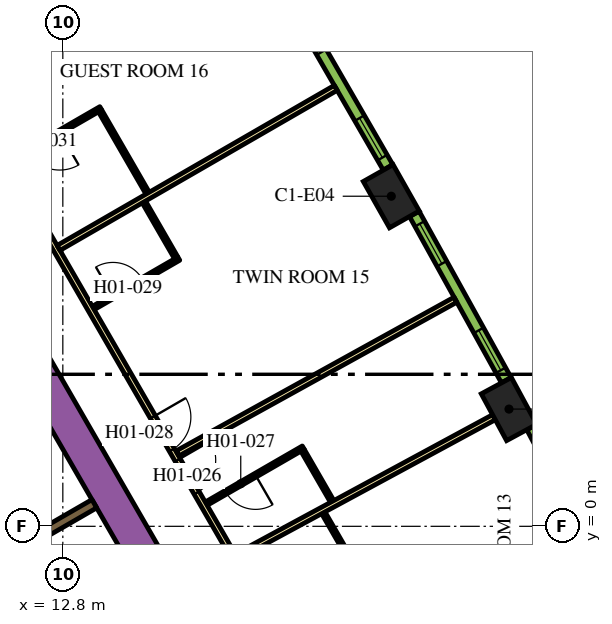
"""IFC4 building model, lengths in metres.
Left out: names, types, materials, properties, quantities, classifications, styles, units other than length and angle.
Written with IfcOpenShell. Run it as: python <this file> out.ifc"""

import sys

from ifc_helpers import new_model, si_unit, direction, frame, frame_2d, origin, origin_2d, place, context, subcontext, project, spatial, rectangle, extrude, element, fill, save


model = new_model("IFC4")
c1 = context("Model", 3, precision=1e-05, world=origin(), true_north=direction((0.0, 1.0)))
c2 = subcontext(c1, "Body", "Model", "MODEL_VIEW")
j1 = project(units=[si_unit("LENGTHUNIT", "METRE"), si_unit("PLANEANGLEUNIT", "RADIAN")], contexts=[c1])
p1 = place(None, origin())
s1 = spatial("IfcSite", under=j1, at=p1, CompositionType="ELEMENT")
p2 = place(p1, origin())
s2 = spatial("IfcBuilding", under=s1, at=p2, CompositionType="ELEMENT")
p3 = place(p2, frame((0.0, 0.0, 31.5)))
s3 = spatial("IfcBuildingStorey", under=s2, at=p3, CompositionType="ELEMENT", Elevation=31.5)
for number, where, z_axis, x_axis in (
    (1, (24.54, 3.085, 0.0), (0.0, 0.0, 1.0), (-0.476, 0.88, 0.0)),
    (2, (21.443, 8.685, 0.0), (0.0, 0.0, 1.0), (-0.492, 0.871, 0.0)),
):
    element("IfcColumn", number, at=place(p3, frame(where, z_axis=z_axis, x_axis=x_axis)), inside=s3, PredefinedType="COLUMN", context=c2, shape_type="SweptSolid", body=[
        extrude(rectangle(XDim=1.4, YDim=0.9, at=origin_2d()), origin(), (0.0, 0.0, 1.0), 3.9),
    ])
p4 = place(p3, frame((6.711, 13.476, 0.0), z_axis=(0.0, 0.0, 1.0), x_axis=(0.500002723396, -0.866023831425, 0.0)))
e3 = element("IfcWall", 3, at=p4, inside=s3, PredefinedType="SOLIDWALL", context=c2, shape_type="SweptSolid", body=[
    extrude(rectangle(XDim=20.334, YDim=0.9, at=frame_2d((10.167, 0.0))), origin(), (0.0, 0.0, 1.0), 3.9),
])
p5 = place(p3, frame((13.629, 0.594, 0.0), z_axis=(0.0, 0.0, 1.0), x_axis=(-0.86602790099, -0.499995674689, 0.0)))
e4 = element("IfcWall", 4, at=p5, inside=s3, PredefinedType="SOLIDWALL", context=c2, shape_type="SweptSolid", body=[
    extrude(rectangle(XDim=3.146, YDim=0.25, at=frame_2d((1.573, 0.0))), origin(), (0.0, 0.0, 1.0), 3.9),
])
p6 = place(p3, frame((6.163, 18.475, 0.0), z_axis=(0.0, 0.0, 1.0), x_axis=(0.500001317485, -0.866024643133, 0.0)))
e5 = element("IfcWall", 5, at=p6, inside=s3, PredefinedType="PARTITIONING", context=c2, shape_type="SweptSolid", body=[
    extrude(rectangle(XDim=25.767, YDim=0.15, at=frame_2d((12.883, 0.0))), origin(), (0.0, 0.0, 1.0), 2.75),
])
p7 = place(p6, frame((24.586, 0.0, 0.0)))
e6 = element("IfcOpeningElement", 6, at=p7, cuts=e5, PredefinedType="OPENING", context=c2, shape_type="SweptSolid", body=[
    extrude(rectangle(XDim=1.0, YDim=2.1, at=frame_2d((0.5, 1.05))), frame((0.0, 0.085, 0.0), z_axis=(0.0, -1.0, 0.0), x_axis=(1.0, 0.0, 0.0)), (0.0, 0.0, 1.0), 0.17),
])
p8 = place(p6, frame((19.319, 0.0, 0.0)))
e7 = element("IfcOpeningElement", 7, at=p8, cuts=e5, PredefinedType="OPENING", context=c2, shape_type="SweptSolid", body=[
    extrude(rectangle(XDim=1.0, YDim=2.1, at=frame_2d((0.5, 1.05))), frame((0.0, 0.085, 0.0), z_axis=(0.0, -1.0, 0.0), x_axis=(1.0, 0.0, 0.0)), (0.0, 0.0, 1.0), 0.17),
])
p9 = place(p6, frame((18.012, 0.0, 0.0)))
e8 = element("IfcOpeningElement", 8, at=p9, cuts=e5, PredefinedType="OPENING", context=c2, shape_type="SweptSolid", body=[
    extrude(rectangle(XDim=1.0, YDim=2.1, at=frame_2d((0.5, 1.05))), frame((0.0, 0.085, 0.0), z_axis=(0.0, -1.0, 0.0), x_axis=(1.0, 0.0, 0.0)), (0.0, 0.0, 1.0), 0.17),
])
p10 = place(p6, frame((6.824, 0.0, 0.0)))
e9 = element("IfcOpeningElement", 9, at=p10, cuts=e5, PredefinedType="OPENING", context=c2, shape_type="SweptSolid", body=[
    extrude(rectangle(XDim=1.1, YDim=2.1, at=frame_2d((0.55, 1.05))), frame((0.0, 0.085, 0.0), z_axis=(0.0, -1.0, 0.0), x_axis=(1.0, 0.0, 0.0)), (0.0, 0.0, 1.0), 0.17),
])
p11 = place(p6, frame((4.658, 0.0, 0.0)))
e10 = element("IfcOpeningElement", 10, at=p11, cuts=e5, PredefinedType="OPENING", context=c2, shape_type="SweptSolid", body=[
    extrude(rectangle(XDim=0.9, YDim=2.1, at=frame_2d((0.45, 1.05))), frame((0.0, 0.085, 0.0), z_axis=(0.0, -1.0, 0.0), x_axis=(1.0, 0.0, 0.0)), (0.0, 0.0, 1.0), 0.17),
])
p12 = place(p6, frame((0.18, 0.0, 0.0)))
e11 = element("IfcOpeningElement", 11, at=p12, cuts=e5, PredefinedType="OPENING", context=c2, shape_type="SweptSolid", body=[
    extrude(rectangle(XDim=1.0, YDim=2.1, at=frame_2d((0.5, 1.05))), frame((0.0, 0.085, 0.0), z_axis=(0.0, -1.0, 0.0), x_axis=(1.0, 0.0, 0.0)), (0.0, 0.0, 1.0), 0.17),
])
p13 = place(p3, frame((19.982, 11.537, 0.0), z_axis=(0.0, 0.0, 1.0), x_axis=(-0.866020994654, -0.500007636761, 0.0)))
e12 = element("IfcWall", 12, at=p13, inside=s3, PredefinedType="PARTITIONING", context=c2, shape_type="SweptSolid", body=[
    extrude(rectangle(XDim=8.423, YDim=0.15, at=frame_2d((4.211, 0.0))), origin(), (0.0, 0.0, 1.0), 2.75),
])
p14 = place(p3, frame((23.132, 5.962, 0.0), z_axis=(0.0, 0.0, 1.0), x_axis=(-0.875121716713, -0.483902863121, 0.0)))
e13 = element("IfcWall", 13, at=p14, inside=s3, PredefinedType="PARTITIONING", context=c2, shape_type="SweptSolid", body=[
    extrude(rectangle(XDim=8.355, YDim=0.15, at=frame_2d((4.178, 0.0))), origin(), (0.0, 0.0, 1.0), 2.75),
])
p15 = place(p3, frame((24.145, 2.871, 0.0), z_axis=(0.0, 0.0, 1.0), x_axis=(-0.879551725039, -0.475803281809, 0.0)))
e14 = element("IfcWall", 14, at=p15, inside=s3, PredefinedType="PARTITIONING", context=c2, shape_type="SweptSolid", body=[
    extrude(rectangle(XDim=7.688, YDim=0.15, at=frame_2d((3.844, 0.0))), origin(), (0.0, 0.0, 1.0), 2.75),
])
p16 = place(p3, frame((20.434, -0.993, 0.0), z_axis=(0.0, 0.0, 1.0), x_axis=(-0.500086022567, 0.865975732936, 0.0)))
e15 = element("IfcWall", 15, at=p16, inside=s3, PredefinedType="PARTITIONING", context=c2, shape_type="SweptSolid", body=[
    extrude(rectangle(XDim=1.55, YDim=0.1, at=frame_2d((0.775, 0.0))), origin(), (0.0, 0.0, 1.0), 2.75),
])
p17 = place(p3, frame((19.127, 2.071, 0.0), z_axis=(0.0, 0.0, 1.0), x_axis=(-0.866003658127, -0.500037662692, 0.0)))
e16 = element("IfcWall", 16, at=p17, inside=s3, PredefinedType="PARTITIONING", context=c2, shape_type="SweptSolid", body=[
    extrude(rectangle(XDim=2.95, YDim=0.1, at=frame_2d((1.475, 0.0))), origin(), (0.0, 0.0, 1.0), 2.75),
])
p18 = place(p17, frame((1.45, 0.0, 0.0)))
e17 = element("IfcOpeningElement", 17, at=p18, cuts=e16, PredefinedType="OPENING", context=c2, shape_type="SweptSolid", body=[
    extrude(rectangle(XDim=0.9, YDim=2.1, at=frame_2d((0.45, 1.05))), frame((0.0, 0.06, 0.0), z_axis=(0.0, -1.0, 0.0), x_axis=(1.0, 0.0, 0.0)), (0.0, 0.0, 1.0), 0.12),
])
p19 = place(p3, frame((19.109, 2.002, 0.0), z_axis=(0.0, 0.0, 1.0), x_axis=(0.500086022567, -0.865975732936, 0.0)))
e18 = element("IfcWall", 18, at=p19, inside=s3, PredefinedType="PARTITIONING", context=c2, shape_type="SweptSolid", body=[
    extrude(rectangle(XDim=1.55, YDim=0.1, at=frame_2d((0.775, 0.0))), origin(), (0.0, 0.0, 1.0), 2.75),
])
p20 = place(p3, frame((13.6, 5.744, 0.0), z_axis=(0.0, 0.0, 1.0), x_axis=(0.866021400173, 0.500006934395, 0.0)))
e19 = element("IfcWall", 19, at=p20, inside=s3, PredefinedType="PARTITIONING", context=c2, shape_type="SweptSolid", body=[
    extrude(rectangle(XDim=2.6, YDim=0.1, at=frame_2d((1.3, 0.0))), origin(), (0.0, 0.0, 1.0), 2.75),
])
p21 = place(p20, frame((0.6, 0.0, 0.0)))
e20 = element("IfcOpeningElement", 20, at=p21, cuts=e19, PredefinedType="OPENING", context=c2, shape_type="SweptSolid", body=[
    extrude(rectangle(XDim=0.9, YDim=2.1, at=frame_2d((0.45, 1.05))), frame((0.0, 0.06, 0.0), z_axis=(0.0, -1.0, 0.0), x_axis=(1.0, 0.0, 0.0)), (0.0, 0.0, 1.0), 0.12),
])
p22 = place(p3, frame((15.779, 7.071, 0.0), z_axis=(0.0, 0.0, 1.0), x_axis=(-0.499976720371, 0.866038843867, 0.0)))
e21 = element("IfcWall", 21, at=p22, inside=s3, PredefinedType="PARTITIONING", context=c2, shape_type="SweptSolid", body=[
    extrude(rectangle(XDim=1.69, YDim=0.1, at=frame_2d((0.845, 0.0))), origin(), (0.0, 0.0, 1.0), 2.75),
])
p23 = place(p3, frame((13.799, 10.999, 0.0), z_axis=(0.0, 0.0, 1.0), x_axis=(-0.866034573852, -0.49998411664, 0.0)))
e22 = element("IfcWall", 22, at=p23, inside=s3, PredefinedType="PARTITIONING", context=c2, shape_type="SweptSolid", body=[
    extrude(rectangle(XDim=2.8, YDim=0.1, at=frame_2d((1.4, 0.0))), origin(), (0.0, 0.0, 1.0), 2.75),
])
p24 = place(p23, frame((1.25, 0.0, 0.0)))
e23 = element("IfcOpeningElement", 23, at=p24, cuts=e22, PredefinedType="OPENING", context=c2, shape_type="SweptSolid", body=[
    extrude(rectangle(XDim=1.0, YDim=2.1, at=frame_2d((0.5, 1.05))), frame((0.0, 0.06, 0.0), z_axis=(0.0, -1.0, 0.0), x_axis=(1.0, 0.0, 0.0)), (0.0, 0.0, 1.0), 0.12),
])
p25 = place(p3, frame((13.781, 10.931, 0.0), z_axis=(0.0, 0.0, 1.0), x_axis=(0.500004234368, -0.866022959057, 0.0)))
e24 = element("IfcWall", 24, at=p25, inside=s3, PredefinedType="PARTITIONING", context=c2, shape_type="SweptSolid", body=[
    extrude(rectangle(XDim=2.5, YDim=0.1, at=frame_2d((1.25, 0.0))), origin(), (0.0, 0.0, 1.0), 2.75),
])
p26 = place(p3, frame((27.475, -1.81, 0.0), z_axis=(0.0, 0.0, 1.0), x_axis=(-0.467629620899, 0.883924509026, 0.0)))
e25 = element("IfcWall", 25, at=p26, inside=s3, PredefinedType="SOLIDWALL", context=c2, shape_type="SweptSolid", body=[
    extrude(rectangle(XDim=4.998, YDim=0.29, at=frame_2d((2.499, 0.0))), origin(), (0.0, 0.0, 1.0), 3.65),
])
p27 = place(p26, frame((0.297, 0.0, 0.9)))
e26 = element("IfcOpeningElement", 26, at=p27, cuts=e25, PredefinedType="OPENING", context=c2, shape_type="SweptSolid", body=[
    extrude(rectangle(XDim=1.2, YDim=2.15, at=frame_2d((0.6, 1.075))), frame((0.0, 0.155, 0.0), z_axis=(0.0, -1.0, 0.0), x_axis=(1.0, 0.0, 0.0)), (0.0, 0.0, 1.0), 0.31),
])
p28 = place(p26, frame((3.501, 0.0, 0.9)))
e27 = element("IfcOpeningElement", 27, at=p28, cuts=e25, PredefinedType="OPENING", context=c2, shape_type="SweptSolid", body=[
    extrude(rectangle(XDim=1.2, YDim=2.15, at=frame_2d((0.6, 1.075))), frame((0.0, 0.155, 0.0), z_axis=(0.0, -1.0, 0.0), x_axis=(1.0, 0.0, 0.0)), (0.0, 0.0, 1.0), 0.31),
])
p29 = place(p3, frame((24.468, 3.846, 0.0), z_axis=(0.0, 0.0, 1.0), x_axis=(-0.483912572871, 0.875116347589, 0.0)))
e28 = element("IfcWall", 28, at=p29, inside=s3, PredefinedType="SOLIDWALL", context=c2, shape_type="SweptSolid", body=[
    extrude(rectangle(XDim=4.998, YDim=0.29, at=frame_2d((2.499, 0.0))), origin(), (0.0, 0.0, 1.0), 3.65),
])
p30 = place(p29, frame((0.297, 0.0, 0.9)))
e29 = element("IfcOpeningElement", 29, at=p30, cuts=e28, PredefinedType="OPENING", context=c2, shape_type="SweptSolid", body=[
    extrude(rectangle(XDim=1.2, YDim=2.15, at=frame_2d((0.6, 1.075))), frame((0.0, 0.155, 0.0), z_axis=(0.0, -1.0, 0.0), x_axis=(1.0, 0.0, 0.0)), (0.0, 0.0, 1.0), 0.31),
])
p31 = place(p29, frame((3.501, 0.0, 0.9)))
e30 = element("IfcOpeningElement", 30, at=p31, cuts=e28, PredefinedType="OPENING", context=c2, shape_type="SweptSolid", body=[
    extrude(rectangle(XDim=1.2, YDim=2.15, at=frame_2d((0.6, 1.075))), frame((0.0, 0.155, 0.0), z_axis=(0.0, -1.0, 0.0), x_axis=(1.0, 0.0, 0.0)), (0.0, 0.0, 1.0), 0.31),
])
p32 = place(p3, frame((21.357, 9.445, 0.0), z_axis=(0.0, 0.0, 1.0), x_axis=(-0.50002123722, 0.866013142123, 0.0)))
e31 = element("IfcWall", 31, at=p32, inside=s3, PredefinedType="SOLIDWALL", context=c2, shape_type="SweptSolid", body=[
    extrude(rectangle(XDim=4.998, YDim=0.29, at=frame_2d((2.499, 0.0))), origin(), (0.0, 0.0, 1.0), 3.65),
])
p33 = place(p32, frame((0.297, 0.0, 0.9)))
e32 = element("IfcOpeningElement", 32, at=p33, cuts=e31, PredefinedType="OPENING", context=c2, shape_type="SweptSolid", body=[
    extrude(rectangle(XDim=1.2, YDim=2.15, at=frame_2d((0.6, 1.075))), frame((0.0, 0.155, 0.0), z_axis=(0.0, -1.0, 0.0), x_axis=(1.0, 0.0, 0.0)), (0.0, 0.0, 1.0), 0.31),
])
p34 = place(p32, frame((3.501, 0.0, 0.9)))
e33 = element("IfcOpeningElement", 33, at=p34, cuts=e31, PredefinedType="OPENING", context=c2, shape_type="SweptSolid", body=[
    extrude(rectangle(XDim=1.2, YDim=2.15, at=frame_2d((0.6, 1.075))), frame((0.0, 0.155, 0.0), z_axis=(0.0, -1.0, 0.0), x_axis=(1.0, 0.0, 0.0)), (0.0, 0.0, 1.0), 0.31),
])
p35 = place(p8, origin())
e34 = element("IfcDoor", 34, at=p35, inside=s3, OperationType="SINGLE_SWING_LEFT", PredefinedType="DOOR", context=c2, shape_type="SweptSolid", body=[
    extrude(rectangle(XDim=1.0, YDim=2.1, at=frame_2d((0.5, 1.05))), frame((0.0, 0.025, 0.0), z_axis=(0.0, -1.0, 0.0), x_axis=(1.0, 0.0, 0.0)), (0.0, 0.0, 1.0), 0.05),
])
fill(e7, e34)
p36 = place(p18, origin())
e35 = element("IfcDoor", 35, at=p36, inside=s3, OperationType="SINGLE_SWING_LEFT", PredefinedType="DOOR", context=c2, shape_type="SweptSolid", body=[
    extrude(rectangle(XDim=0.9, YDim=2.1, at=frame_2d((0.45, 1.05))), frame((0.0, 0.025, 0.0), z_axis=(0.0, -1.0, 0.0), x_axis=(1.0, 0.0, 0.0)), (0.0, 0.0, 1.0), 0.05),
])
fill(e17, e35)
p37 = place(p9, origin())
e36 = element("IfcDoor", 36, at=p37, inside=s3, OperationType="SINGLE_SWING_RIGHT", PredefinedType="DOOR", context=c2, shape_type="SweptSolid", body=[
    extrude(rectangle(XDim=1.0, YDim=2.1, at=frame_2d((0.5, 1.05))), frame((0.0, 0.025, 0.0), z_axis=(0.0, -1.0, 0.0), x_axis=(1.0, 0.0, 0.0)), (0.0, 0.0, 1.0), 0.05),
])
fill(e8, e36)
p38 = place(p21, origin())
e37 = element("IfcDoor", 37, at=p38, inside=s3, OperationType="SINGLE_SWING_RIGHT", PredefinedType="DOOR", context=c2, shape_type="SweptSolid", body=[
    extrude(rectangle(XDim=0.9, YDim=2.1, at=frame_2d((0.45, 1.05))), frame((0.0, 0.025, 0.0), z_axis=(0.0, -1.0, 0.0), x_axis=(1.0, 0.0, 0.0)), (0.0, 0.0, 1.0), 0.05),
])
fill(e20, e37)
p39 = place(p24, origin())
e38 = element("IfcDoor", 38, at=p39, inside=s3, OperationType="SINGLE_SWING_LEFT", PredefinedType="DOOR", context=c2, shape_type="SweptSolid", body=[
    extrude(rectangle(XDim=1.0, YDim=2.1, at=frame_2d((0.5, 1.05))), frame((0.0, 0.025, 0.0), z_axis=(0.0, -1.0, 0.0), x_axis=(1.0, 0.0, 0.0)), (0.0, 0.0, 1.0), 0.05),
])
fill(e23, e38)
p40 = place(p30, origin())
e39 = element("IfcWindow", 39, at=p40, inside=s3, PartitioningType="DOUBLE_PANEL_VERTICAL", PredefinedType="WINDOW", context=c2, shape_type="SweptSolid", body=[
    extrude(rectangle(XDim=1.2, YDim=2.15, at=frame_2d((0.6, 1.075))), frame((0.0, 0.015, 0.0), z_axis=(0.0, -1.0, 0.0), x_axis=(1.0, 0.0, 0.0)), (0.0, 0.0, 1.0), 0.06),
])
fill(e29, e39)
p41 = place(p31, origin())
e40 = element("IfcWindow", 40, at=p41, inside=s3, PartitioningType="DOUBLE_PANEL_VERTICAL", PredefinedType="WINDOW", context=c2, shape_type="SweptSolid", body=[
    extrude(rectangle(XDim=1.2, YDim=2.15, at=frame_2d((0.6, 1.075))), frame((0.0, 0.015, 0.0), z_axis=(0.0, -1.0, 0.0), x_axis=(1.0, 0.0, 0.0)), (0.0, 0.0, 1.0), 0.06),
])
fill(e30, e40)
p42 = place(p33, origin())
e41 = element("IfcWindow", 41, at=p42, inside=s3, PartitioningType="DOUBLE_PANEL_VERTICAL", PredefinedType="WINDOW", context=c2, shape_type="SweptSolid", body=[
    extrude(rectangle(XDim=1.2, YDim=2.15, at=frame_2d((0.6, 1.075))), frame((0.0, 0.015, 0.0), z_axis=(0.0, -1.0, 0.0), x_axis=(1.0, 0.0, 0.0)), (0.0, 0.0, 1.0), 0.06),
])
fill(e32, e41)
p43 = place(p34, origin())
e42 = element("IfcWindow", 42, at=p43, inside=s3, PartitioningType="DOUBLE_PANEL_VERTICAL", PredefinedType="WINDOW", context=c2, shape_type="SweptSolid", body=[
    extrude(rectangle(XDim=1.2, YDim=2.15, at=frame_2d((0.6, 1.075))), frame((0.0, 0.015, 0.0), z_axis=(0.0, -1.0, 0.0), x_axis=(1.0, 0.0, 0.0)), (0.0, 0.0, 1.0), 0.06),
])
fill(e33, e42)
save(model, sys.argv[1])
